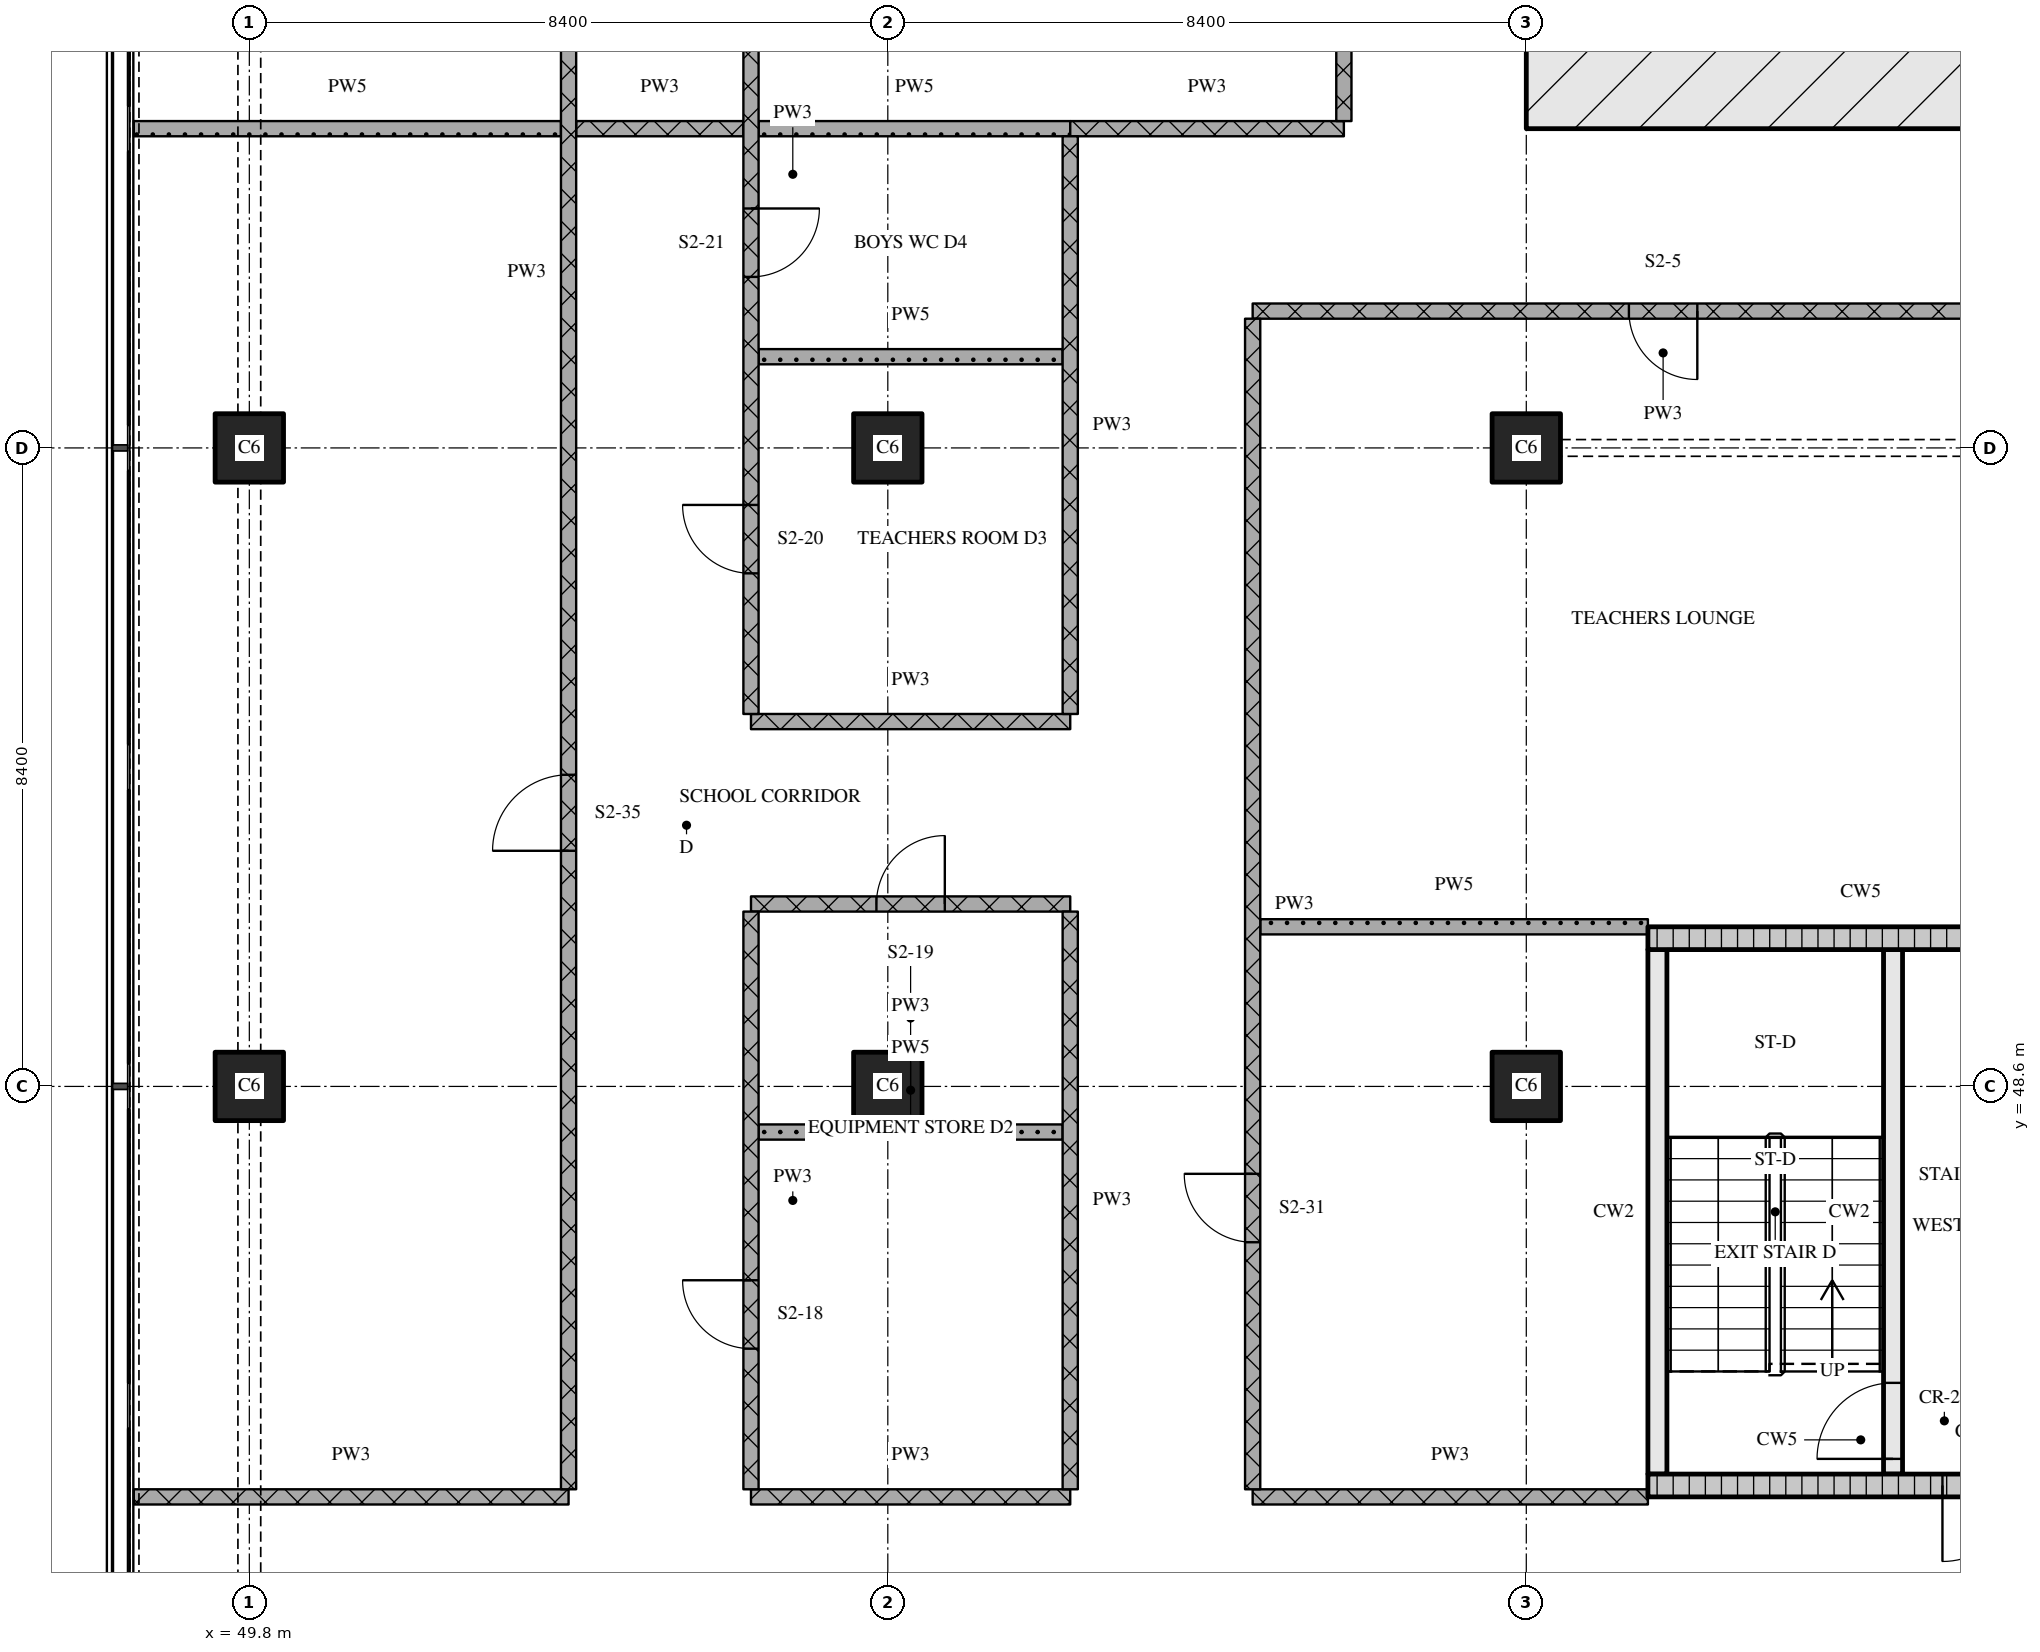
"""IFC4 building model, lengths in metres.
Left out: names, types, materials, properties, quantities, classifications, styles, units other than length and angle.
Written with IfcOpenShell. Run it as: python <this file> out.ifc"""

import sys

from ifc_helpers import new_model, si_unit, direction, frame, frame_2d, origin, origin_2d, place, context, subcontext, project, spatial, rectangle, extrude, element, fill, save


model = new_model("IFC4")
c1 = context("Model", 3, precision=1e-05, world=origin(), true_north=direction((0.0, 1.0)))
c2 = subcontext(c1, "Body", "Model", "MODEL_VIEW")
j1 = project(units=[si_unit("LENGTHUNIT", "METRE"), si_unit("PLANEANGLEUNIT", "RADIAN")], contexts=[c1])
p1 = place(None, origin())
s1 = spatial("IfcSite", under=j1, at=p1, CompositionType="ELEMENT")
p2 = place(p1, origin())
s2 = spatial("IfcBuilding", under=s1, at=p2, CompositionType="ELEMENT")
p3 = place(p2, frame((0.0, 0.0, 23.7)))
s3 = spatial("IfcBuildingStorey", under=s2, at=p3, CompositionType="ELEMENT", Elevation=23.7)
for number, where, z_axis, x_axis in (
    (1, (49.8, 48.6, 0.0), (0.0, 0.0, 1.0), (1.0, 0.0, 0.0)),
    (2, (49.8, 57.0, 0.0), (0.0, 0.0, 1.0), (1.0, 0.0, 0.0)),
    (3, (58.2, 48.6, 0.0), (0.0, 0.0, 1.0), (1.0, 0.0, 0.0)),
    (4, (58.2, 57.0, 0.0), (0.0, 0.0, 1.0), (1.0, 0.0, 0.0)),
    (5, (66.6, 48.6, 0.0), (0.0, 0.0, 1.0), (1.0, 0.0, 0.0)),
    (6, (66.6, 57.0, 0.0), (0.0, 0.0, 1.0), (1.0, 0.0, 0.0)),
):
    element("IfcColumn", number, at=place(p3, frame(where, z_axis=z_axis, x_axis=x_axis)), inside=s3, PredefinedType="COLUMN", context=c2, shape_type="SweptSolid", body=[
        extrude(rectangle(XDim=0.9, YDim=0.9, at=origin_2d()), origin(), (0.0, 0.0, 1.0), 4.5),
    ])
p4 = place(p3, frame((66.6, 61.8, 0.0), z_axis=(0.0, 0.0, 1.0), x_axis=(1.0, 0.0, 0.0)))
e7 = element("IfcWall", 7, at=p4, inside=s3, PredefinedType="SOLIDWALL", context=c2, shape_type="SweptSolid", body=[
    extrude(rectangle(XDim=42.0, YDim=1.2, at=frame_2d((21.0, 0.0))), origin(), (0.0, 0.0, 1.0), 4.2),
])
p5 = place(p4, frame((21.35, 0.0, 0.0)))
e8 = element("IfcOpeningElement", 8, at=p5, cuts=e7, PredefinedType="OPENING", context=c2, shape_type="SweptSolid", body=[
    extrude(rectangle(XDim=1.8, YDim=2.1, at=frame_2d((0.9, 1.05))), frame((0.0, 0.61, 0.0), z_axis=(0.0, -1.0, 0.0), x_axis=(1.0, 0.0, 0.0)), (0.0, 0.0, 1.0), 1.22),
])
p6 = place(p3, frame((68.2, 43.35, 0.0), z_axis=(0.0, 0.0, 1.0), x_axis=(1.0, 0.0, 0.0)))
e9 = element("IfcWall", 9, at=p6, inside=s3, PredefinedType="SOLIDWALL", context=c2, shape_type="SweptSolid", body=[
    extrude(rectangle(XDim=5.6, YDim=0.3, at=frame_2d((2.8, 0.0))), origin(), (0.0, 0.0, 1.0), 4.2),
])
p7 = place(p6, frame((3.875, 0.0, 0.0)))
e10 = element("IfcOpeningElement", 10, at=p7, cuts=e9, PredefinedType="OPENING", context=c2, shape_type="SweptSolid", body=[
    extrude(rectangle(XDim=1.0, YDim=2.1, at=frame_2d((0.5, 1.05))), frame((0.0, 0.16, 0.0), z_axis=(0.0, -1.0, 0.0), x_axis=(1.0, 0.0, 0.0)), (0.0, 0.0, 1.0), 0.32),
])
p8 = place(p3, frame((68.325, 43.5, 0.0), z_axis=(0.0, 0.0, 1.0), x_axis=(0.0, 1.0, 0.0)))
e11 = element("IfcWall", 11, at=p8, inside=s3, PredefinedType="SOLIDWALL", context=c2, shape_type="SweptSolid", body=[
    extrude(rectangle(XDim=6.9, YDim=0.25, at=frame_2d((3.45, 0.0))), origin(), (0.0, 0.0, 1.0), 4.2),
])
p9 = place(p3, frame((71.425, 43.5, 0.0), z_axis=(0.0, 0.0, 1.0), x_axis=(0.0, 1.0, 0.0)))
e12 = element("IfcWall", 12, at=p9, inside=s3, PredefinedType="SOLIDWALL", context=c2, shape_type="SweptSolid", body=[
    extrude(rectangle(XDim=6.9, YDim=0.25, at=frame_2d((3.45, 0.0))), origin(), (0.0, 0.0, 1.0), 4.2),
])
p10 = place(p9, frame((0.2, 0.0, 0.0)))
e13 = element("IfcOpeningElement", 13, at=p10, cuts=e12, PredefinedType="OPENING", context=c2, shape_type="SweptSolid", body=[
    extrude(rectangle(XDim=1.0, YDim=2.1, at=frame_2d((0.5, 1.05))), frame((0.0, 0.135, 0.0), z_axis=(0.0, -1.0, 0.0), x_axis=(1.0, 0.0, 0.0)), (0.0, 0.0, 1.0), 0.27),
])
p11 = place(p3, frame((68.2, 50.55, 0.0), z_axis=(0.0, 0.0, 1.0), x_axis=(1.0, 0.0, 0.0)))
e14 = element("IfcWall", 14, at=p11, inside=s3, PredefinedType="SOLIDWALL", context=c2, shape_type="SweptSolid", body=[
    extrude(rectangle(XDim=5.6, YDim=0.3, at=frame_2d((2.8, 0.0))), origin(), (0.0, 0.0, 1.0), 4.2),
])
p12 = place(p3, frame((48.28, 43.2, 0.0), z_axis=(0.0, 0.0, 1.0), x_axis=(1.0, 0.0, 0.0)))
e15 = element("IfcWall", 15, at=p12, inside=s3, PredefinedType="PARTITIONING", context=c2, shape_type="SweptSolid", body=[
    extrude(rectangle(XDim=5.72, YDim=0.2, at=frame_2d((2.86, 0.0))), origin(), (0.0, 0.0, 1.0), 4.2),
])
p13 = place(p3, frame((56.4, 43.2, 0.0), z_axis=(0.0, 0.0, 1.0), x_axis=(1.0, 0.0, 0.0)))
e16 = element("IfcWall", 16, at=p13, inside=s3, PredefinedType="PARTITIONING", context=c2, shape_type="SweptSolid", body=[
    extrude(rectangle(XDim=4.2, YDim=0.2, at=frame_2d((2.1, 0.0))), origin(), (0.0, 0.0, 1.0), 4.2),
])
p14 = place(p3, frame((63.0, 43.2, 0.0), z_axis=(0.0, 0.0, 1.0), x_axis=(1.0, 0.0, 0.0)))
e17 = element("IfcWall", 17, at=p14, inside=s3, PredefinedType="PARTITIONING", context=c2, shape_type="SweptSolid", body=[
    extrude(rectangle(XDim=5.2, YDim=0.2, at=frame_2d((2.6, 0.0))), origin(), (0.0, 0.0, 1.0), 4.2),
])
p15 = place(p3, frame((56.5, 48.0, 0.0), z_axis=(0.0, 0.0, 1.0), x_axis=(1.0, 0.0, 0.0)))
e18 = element("IfcWall", 18, at=p15, inside=s3, PredefinedType="PARTITIONING", context=c2, shape_type="SweptSolid", body=[
    extrude(rectangle(XDim=4.0, YDim=0.2, at=frame_2d((2.0, 0.0))), origin(), (0.0, 0.0, 1.0), 4.2),
])
p16 = place(p3, frame((63.1, 50.7, 0.0), z_axis=(0.0, 0.0, 1.0), x_axis=(1.0, 0.0, 0.0)))
e19 = element("IfcWall", 19, at=p16, inside=s3, PredefinedType="PARTITIONING", context=c2, shape_type="SweptSolid", body=[
    extrude(rectangle(XDim=5.1, YDim=0.2, at=frame_2d((2.55, 0.0))), origin(), (0.0, 0.0, 1.0), 4.2),
])
p17 = place(p3, frame((60.6, 51.0, 0.0), z_axis=(0.0, 0.0, 1.0), x_axis=(-1.0, 0.0, 0.0)))
e20 = element("IfcWall", 20, at=p17, inside=s3, PredefinedType="PARTITIONING", context=c2, shape_type="SweptSolid", body=[
    extrude(rectangle(XDim=4.2, YDim=0.2, at=frame_2d((2.1, 0.0))), origin(), (0.0, 0.0, 1.0), 4.2),
])
p18 = place(p17, frame((1.65, 0.0, 0.0)))
e21 = element("IfcOpeningElement", 21, at=p18, cuts=e20, PredefinedType="OPENING", context=c2, shape_type="SweptSolid", body=[
    extrude(rectangle(XDim=0.9, YDim=2.1, at=frame_2d((0.45, 1.05))), frame((0.0, 0.11, 0.0), z_axis=(0.0, -1.0, 0.0), x_axis=(1.0, 0.0, 0.0)), (0.0, 0.0, 1.0), 0.22),
])
p19 = place(p3, frame((56.4, 53.4, 0.0), z_axis=(0.0, 0.0, 1.0), x_axis=(1.0, 0.0, 0.0)))
e22 = element("IfcWall", 22, at=p19, inside=s3, PredefinedType="PARTITIONING", context=c2, shape_type="SweptSolid", body=[
    extrude(rectangle(XDim=4.2, YDim=0.2, at=frame_2d((2.1, 0.0))), origin(), (0.0, 0.0, 1.0), 4.2),
])
p20 = place(p3, frame((56.5, 58.2, 0.0), z_axis=(0.0, 0.0, 1.0), x_axis=(1.0, 0.0, 0.0)))
e23 = element("IfcWall", 23, at=p20, inside=s3, PredefinedType="PARTITIONING", context=c2, shape_type="SweptSolid", body=[
    extrude(rectangle(XDim=4.0, YDim=0.2, at=frame_2d((2.0, 0.0))), origin(), (0.0, 0.0, 1.0), 4.2),
])
p21 = place(p3, frame((73.8, 58.8, 0.0), z_axis=(0.0, 0.0, 1.0), x_axis=(-1.0, 0.0, 0.0)))
e24 = element("IfcWall", 24, at=p21, inside=s3, PredefinedType="PARTITIONING", context=c2, shape_type="SweptSolid", body=[
    extrude(rectangle(XDim=10.8, YDim=0.2, at=frame_2d((5.4, 0.0))), origin(), (0.0, 0.0, 1.0), 4.2),
])
p22 = place(p21, frame((4.95, 0.0, 0.0)))
e25 = element("IfcOpeningElement", 25, at=p22, cuts=e24, PredefinedType="OPENING", context=c2, shape_type="SweptSolid", body=[
    extrude(rectangle(XDim=0.9, YDim=2.1, at=frame_2d((0.45, 1.05))), frame((0.0, 0.11, 0.0), z_axis=(0.0, -1.0, 0.0), x_axis=(1.0, 0.0, 0.0)), (0.0, 0.0, 1.0), 0.22),
])
p23 = place(p3, frame((54.1, 61.2, 0.0), z_axis=(0.0, 0.0, 1.0), x_axis=(1.0, 0.0, 0.0)))
e26 = element("IfcWall", 26, at=p23, inside=s3, PredefinedType="PARTITIONING", context=c2, shape_type="SweptSolid", body=[
    extrude(rectangle(XDim=2.2, YDim=0.2, at=frame_2d((1.1, 0.0))), origin(), (0.0, 0.0, 1.0), 4.2),
])
p24 = place(p3, frame((60.6, 61.2, 0.0), z_axis=(0.0, 0.0, 1.0), x_axis=(1.0, 0.0, 0.0)))
e27 = element("IfcWall", 27, at=p24, inside=s3, PredefinedType="PARTITIONING", context=c2, shape_type="SweptSolid", body=[
    extrude(rectangle(XDim=3.6, YDim=0.2, at=frame_2d((1.8, 0.0))), origin(), (0.0, 0.0, 1.0), 4.2),
])
p25 = place(p3, frame((48.28, 61.2, 0.0), z_axis=(0.0, 0.0, 1.0), x_axis=(1.0, 0.0, 0.0)))
e28 = element("IfcWall", 28, at=p25, inside=s3, PredefinedType="PARTITIONING", context=c2, shape_type="SweptSolid", body=[
    extrude(rectangle(XDim=5.62, YDim=0.2, at=frame_2d((2.81, 0.0))), origin(), (0.0, 0.0, 1.0), 4.2),
])
p26 = place(p3, frame((56.5, 61.2, 0.0), z_axis=(0.0, 0.0, 1.0), x_axis=(1.0, 0.0, 0.0)))
e29 = element("IfcWall", 29, at=p26, inside=s3, PredefinedType="PARTITIONING", context=c2, shape_type="SweptSolid", body=[
    extrude(rectangle(XDim=4.1, YDim=0.2, at=frame_2d((2.05, 0.0))), origin(), (0.0, 0.0, 1.0), 4.2),
])
p27 = place(p3, frame((54.0, 43.3, 0.0), z_axis=(0.0, 0.0, 1.0), x_axis=(0.0, 1.0, 0.0)))
e30 = element("IfcWall", 30, at=p27, inside=s3, PredefinedType="PARTITIONING", context=c2, shape_type="SweptSolid", body=[
    extrude(rectangle(XDim=32.02, YDim=0.2, at=frame_2d((16.01, 0.0))), origin(), (0.0, 0.0, 1.0), 4.2),
])
p28 = place(p27, frame((8.4, 0.0, 0.0)))
e31 = element("IfcOpeningElement", 31, at=p28, cuts=e30, PredefinedType="OPENING", context=c2, shape_type="SweptSolid", body=[
    extrude(rectangle(XDim=1.0, YDim=2.1, at=frame_2d((0.5, 1.05))), frame((0.0, 0.11, 0.0), z_axis=(0.0, -1.0, 0.0), x_axis=(1.0, 0.0, 0.0)), (0.0, 0.0, 1.0), 0.22),
])
p29 = place(p27, frame((23.292, 0.0, 0.0)))
e32 = element("IfcOpeningElement", 32, at=p29, cuts=e30, PredefinedType="OPENING", context=c2, shape_type="SweptSolid", body=[
    extrude(rectangle(XDim=1.0, YDim=2.1, at=frame_2d((0.5, 1.05))), frame((0.0, 0.11, 0.0), z_axis=(0.0, -1.0, 0.0), x_axis=(1.0, 0.0, 0.0)), (0.0, 0.0, 1.0), 0.22),
])
p30 = place(p3, frame((56.4, 50.9, 0.0), z_axis=(0.0, 0.0, 1.0), x_axis=(0.0, -1.0, 0.0)))
e33 = element("IfcWall", 33, at=p30, inside=s3, PredefinedType="PARTITIONING", context=c2, shape_type="SweptSolid", body=[
    extrude(rectangle(XDim=7.6, YDim=0.2, at=frame_2d((3.8, 0.0))), origin(), (0.0, 0.0, 1.0), 4.2),
])
p31 = place(p30, frame((4.85, 0.0, 0.0)))
e34 = element("IfcOpeningElement", 34, at=p31, cuts=e33, PredefinedType="OPENING", context=c2, shape_type="SweptSolid", body=[
    extrude(rectangle(XDim=0.9, YDim=2.1, at=frame_2d((0.45, 1.05))), frame((0.0, 0.11, 0.0), z_axis=(0.0, -1.0, 0.0), x_axis=(1.0, 0.0, 0.0)), (0.0, 0.0, 1.0), 0.22),
])
p32 = place(p3, frame((56.4, 67.7, 0.0), z_axis=(0.0, 0.0, 1.0), x_axis=(0.0, -1.0, 0.0)))
e35 = element("IfcWall", 35, at=p32, inside=s3, PredefinedType="PARTITIONING", context=c2, shape_type="SweptSolid", body=[
    extrude(rectangle(XDim=14.2, YDim=0.2, at=frame_2d((7.1, 0.0))), origin(), (0.0, 0.0, 1.0), 4.2),
])
p33 = place(p32, frame((7.55, 0.0, 0.0)))
e36 = element("IfcOpeningElement", 36, at=p33, cuts=e35, PredefinedType="OPENING", context=c2, shape_type="SweptSolid", body=[
    extrude(rectangle(XDim=0.9, YDim=2.1, at=frame_2d((0.45, 1.05))), frame((0.0, 0.11, 0.0), z_axis=(0.0, -1.0, 0.0), x_axis=(1.0, 0.0, 0.0)), (0.0, 0.0, 1.0), 0.22),
])
p34 = place(p32, frame((11.45, 0.0, 0.0)))
e37 = element("IfcOpeningElement", 37, at=p34, cuts=e35, PredefinedType="OPENING", context=c2, shape_type="SweptSolid", body=[
    extrude(rectangle(XDim=0.9, YDim=2.1, at=frame_2d((0.45, 1.05))), frame((0.0, 0.11, 0.0), z_axis=(0.0, -1.0, 0.0), x_axis=(1.0, 0.0, 0.0)), (0.0, 0.0, 1.0), 0.22),
])
p35 = place(p3, frame((60.6, 50.9, 0.0), z_axis=(0.0, 0.0, 1.0), x_axis=(0.0, -1.0, 0.0)))
e38 = element("IfcWall", 38, at=p35, inside=s3, PredefinedType="PARTITIONING", context=c2, shape_type="SweptSolid", body=[
    extrude(rectangle(XDim=7.6, YDim=0.2, at=frame_2d((3.8, 0.0))), origin(), (0.0, 0.0, 1.0), 4.2),
])
p36 = place(p3, frame((60.6, 61.1, 0.0), z_axis=(0.0, 0.0, 1.0), x_axis=(0.0, -1.0, 0.0)))
e39 = element("IfcWall", 39, at=p36, inside=s3, PredefinedType="PARTITIONING", context=c2, shape_type="SweptSolid", body=[
    extrude(rectangle(XDim=7.6, YDim=0.2, at=frame_2d((3.8, 0.0))), origin(), (0.0, 0.0, 1.0), 4.2),
])
p37 = place(p3, frame((63.0, 58.7, 0.0), z_axis=(0.0, 0.0, 1.0), x_axis=(0.0, -1.0, 0.0)))
e40 = element("IfcWall", 40, at=p37, inside=s3, PredefinedType="PARTITIONING", context=c2, shape_type="SweptSolid", body=[
    extrude(rectangle(XDim=15.4, YDim=0.2, at=frame_2d((7.7, 0.0))), origin(), (0.0, 0.0, 1.0), 4.2),
])
p38 = place(p37, frame((11.25, 0.0, 0.0)))
e41 = element("IfcOpeningElement", 41, at=p38, cuts=e40, PredefinedType="OPENING", context=c2, shape_type="SweptSolid", body=[
    extrude(rectangle(XDim=0.9, YDim=2.1, at=frame_2d((0.45, 1.05))), frame((0.0, 0.11, 0.0), z_axis=(0.0, -1.0, 0.0), x_axis=(1.0, 0.0, 0.0)), (0.0, 0.0, 1.0), 0.22),
])
p39 = place(p3, frame((64.2, 67.7, 0.0), z_axis=(0.0, 0.0, 1.0), x_axis=(0.0, -1.0, 0.0)))
e42 = element("IfcWall", 42, at=p39, inside=s3, PredefinedType="PARTITIONING", context=c2, shape_type="SweptSolid", body=[
    extrude(rectangle(XDim=6.4, YDim=0.2, at=frame_2d((3.2, 0.0))), origin(), (0.0, 0.0, 1.0), 4.2),
])
p40 = place(p7, origin())
e43 = element("IfcDoor", 43, at=p40, inside=s3, OperationType="SINGLE_SWING_RIGHT", PredefinedType="DOOR", context=c2, shape_type="SweptSolid", body=[
    extrude(rectangle(XDim=1.0, YDim=2.1, at=frame_2d((0.5, 1.05))), frame((0.0, 0.025, 0.0), z_axis=(0.0, -1.0, 0.0), x_axis=(1.0, 0.0, 0.0)), (0.0, 0.0, 1.0), 0.05),
])
fill(e10, e43)
p41 = place(p10, origin())
e44 = element("IfcDoor", 44, at=p41, inside=s3, OperationType="SINGLE_SWING_LEFT", PredefinedType="DOOR", context=c2, shape_type="SweptSolid", body=[
    extrude(rectangle(XDim=1.0, YDim=2.1, at=frame_2d((0.5, 1.05))), frame((0.0, 0.025, 0.0), z_axis=(0.0, -1.0, 0.0), x_axis=(1.0, 0.0, 0.0)), (0.0, 0.0, 1.0), 0.05),
])
fill(e13, e44)
p42 = place(p18, origin())
e45 = element("IfcDoor", 45, at=p42, inside=s3, OperationType="SINGLE_SWING_RIGHT", PredefinedType="DOOR", context=c2, shape_type="SweptSolid", body=[
    extrude(rectangle(XDim=0.9, YDim=2.1, at=frame_2d((0.45, 1.05))), frame((0.0, 0.025, 0.0), z_axis=(0.0, -1.0, 0.0), x_axis=(1.0, 0.0, 0.0)), (0.0, 0.0, 1.0), 0.05),
])
fill(e21, e45)
p43 = place(p22, origin())
e46 = element("IfcDoor", 46, at=p43, inside=s3, OperationType="SINGLE_SWING_LEFT", PredefinedType="DOOR", context=c2, shape_type="SweptSolid", body=[
    extrude(rectangle(XDim=0.9, YDim=2.1, at=frame_2d((0.45, 1.05))), frame((0.0, 0.025, 0.0), z_axis=(0.0, -1.0, 0.0), x_axis=(1.0, 0.0, 0.0)), (0.0, 0.0, 1.0), 0.05),
])
fill(e25, e46)
p44 = place(p28, origin())
e47 = element("IfcDoor", 47, at=p44, inside=s3, OperationType="SINGLE_SWING_LEFT", PredefinedType="DOOR", context=c2, shape_type="SweptSolid", body=[
    extrude(rectangle(XDim=1.0, YDim=2.1, at=frame_2d((0.5, 1.05))), frame((0.0, 0.025, 0.0), z_axis=(0.0, -1.0, 0.0), x_axis=(1.0, 0.0, 0.0)), (0.0, 0.0, 1.0), 0.05),
])
fill(e31, e47)
p45 = place(p31, origin())
e48 = element("IfcDoor", 48, at=p45, inside=s3, OperationType="SINGLE_SWING_RIGHT", PredefinedType="DOOR", context=c2, shape_type="SweptSolid", body=[
    extrude(rectangle(XDim=0.9, YDim=2.1, at=frame_2d((0.45, 1.05))), frame((0.0, 0.025, 0.0), z_axis=(0.0, -1.0, 0.0), x_axis=(1.0, 0.0, 0.0)), (0.0, 0.0, 1.0), 0.05),
])
fill(e34, e48)
p46 = place(p33, origin())
e49 = element("IfcDoor", 49, at=p46, inside=s3, OperationType="SINGLE_SWING_LEFT", PredefinedType="DOOR", context=c2, shape_type="SweptSolid", body=[
    extrude(rectangle(XDim=0.9, YDim=2.1, at=frame_2d((0.45, 1.05))), frame((0.0, 0.025, 0.0), z_axis=(0.0, -1.0, 0.0), x_axis=(1.0, 0.0, 0.0)), (0.0, 0.0, 1.0), 0.05),
])
fill(e36, e49)
p47 = place(p34, origin())
e50 = element("IfcDoor", 50, at=p47, inside=s3, OperationType="SINGLE_SWING_RIGHT", PredefinedType="DOOR", context=c2, shape_type="SweptSolid", body=[
    extrude(rectangle(XDim=0.9, YDim=2.1, at=frame_2d((0.45, 1.05))), frame((0.0, 0.025, 0.0), z_axis=(0.0, -1.0, 0.0), x_axis=(1.0, 0.0, 0.0)), (0.0, 0.0, 1.0), 0.05),
])
fill(e37, e50)
p48 = place(p38, origin())
e51 = element("IfcDoor", 51, at=p48, inside=s3, OperationType="SINGLE_SWING_RIGHT", PredefinedType="DOOR", context=c2, shape_type="SweptSolid", body=[
    extrude(rectangle(XDim=0.9, YDim=2.1, at=frame_2d((0.45, 1.05))), frame((0.0, 0.025, 0.0), z_axis=(0.0, -1.0, 0.0), x_axis=(1.0, 0.0, 0.0)), (0.0, 0.0, 1.0), 0.05),
])
fill(e41, e51)
save(model, sys.argv[1])
